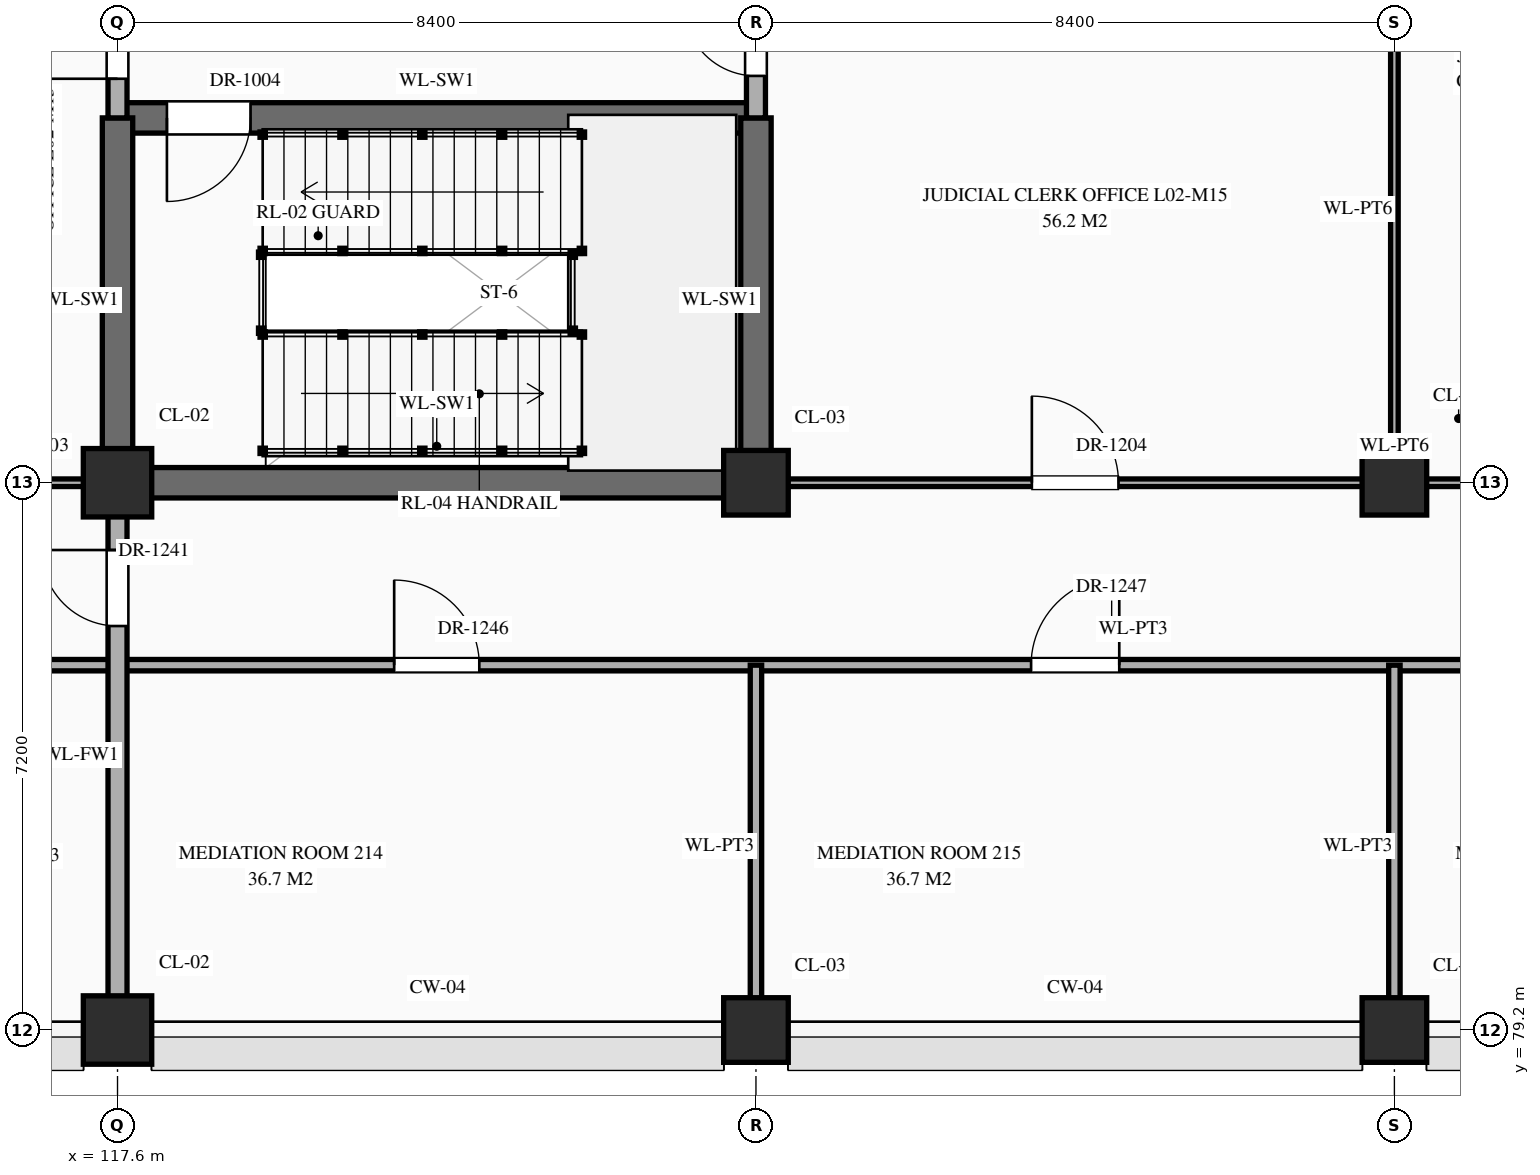
"""IFC4 building model, lengths in metres.
Left out: names, types, materials, properties, quantities, classifications, styles, units other than length and angle.
Written with IfcOpenShell. Run it as: python <this file> out.ifc"""

import sys

from ifc_helpers import new_model, si_unit, direction, frame, frame_2d, origin, origin_2d, place, context, subcontext, project, spatial, rectangle, extrude, element, fill, save


model = new_model("IFC4")
c1 = context("Model", 3, precision=1e-05, world=origin(), true_north=direction((0.0, 1.0)))
c2 = subcontext(c1, "Body", "Model", "MODEL_VIEW")
j1 = project(units=[si_unit("LENGTHUNIT", "METRE"), si_unit("PLANEANGLEUNIT", "RADIAN")], contexts=[c1])
p1 = place(None, origin())
s1 = spatial("IfcSite", under=j1, at=p1, CompositionType="ELEMENT")
p2 = place(p1, origin())
s2 = spatial("IfcBuilding", under=s1, at=p2, CompositionType="ELEMENT")
p3 = place(p2, frame((0.0, 0.0, 5.4)))
s3 = spatial("IfcBuildingStorey", under=s2, at=p3, CompositionType="ELEMENT", Elevation=5.4)
for number, where, z_axis, x_axis in (
    (1, (117.6, 79.2, 0.0), (0.0, 0.0, 1.0), (1.0, 0.0, 0.0)),
    (2, (117.6, 86.4, 0.0), (0.0, 0.0, 1.0), (1.0, 0.0, 0.0)),
):
    element("IfcColumn", number, at=place(p3, frame(where, z_axis=z_axis, x_axis=x_axis)), inside=s3, PredefinedType="COLUMN", context=c2, shape_type="SweptSolid", body=[
        extrude(rectangle(XDim=0.9, YDim=0.9, at=origin_2d()), origin(), (0.0, 0.0, 1.0), 5.4),
    ])
for number, where, z_axis, x_axis in (
    (3, (126.0, 79.2, 0.0), (0.0, 0.0, 1.0), (1.0, 0.0, 0.0)),
    (4, (126.0, 86.4, 0.0), (0.0, 0.0, 1.0), (1.0, 0.0, 0.0)),
    (5, (134.4, 79.2, 0.0), (0.0, 0.0, 1.0), (1.0, 0.0, 0.0)),
    (6, (134.4, 86.4, 0.0), (0.0, 0.0, 1.0), (1.0, 0.0, 0.0)),
):
    element("IfcColumn", number, at=place(p3, frame(where, z_axis=z_axis, x_axis=x_axis)), inside=s3, PredefinedType="COLUMN", context=c2, shape_type="SweptSolid", body=[
        extrude(rectangle(XDim=0.85, YDim=0.85, at=origin_2d()), origin(), (0.0, 0.0, 1.0), 5.4),
    ])
p4 = place(p3, frame((16.8, 84.0, 0.0), z_axis=(0.0, 0.0, 1.0), x_axis=(1.0, 0.0, 0.0)))
e7 = element("IfcWall", 7, at=p4, inside=s3, PredefinedType="STANDARD", context=c2, shape_type="SweptSolid", body=[
    extrude(rectangle(XDim=134.4, YDim=0.15, at=frame_2d((67.2, 0.0))), origin(), (0.0, 0.0, 1.0), 5.12),
])
p5 = place(p4, frame((3.58, 0.0, 0.0)))
e8 = element("IfcOpeningElement", 8, at=p5, cuts=e7, PredefinedType="OPENING", context=c2, shape_type="SweptSolid", body=[
    extrude(rectangle(XDim=1.24, YDim=2.3, at=frame_2d((0.62, 1.15))), frame((0.0, 0.087, 0.0), z_axis=(0.0, -1.0, 0.0), x_axis=(1.0, 0.0, 0.0)), (0.0, 0.0, 1.0), 0.174),
])
p6 = place(p4, frame((11.96, 0.0, 0.0)))
e9 = element("IfcOpeningElement", 9, at=p6, cuts=e7, PredefinedType="OPENING", context=c2, shape_type="SweptSolid", body=[
    extrude(rectangle(XDim=1.28, YDim=2.35, at=frame_2d((0.64, 1.175))), frame((0.0, 0.087, 0.0), z_axis=(0.0, -1.0, 0.0), x_axis=(1.0, 0.0, 0.0)), (0.0, 0.0, 1.0), 0.174),
])
p7 = place(p4, frame((20.53, 0.0, 0.0)))
e10 = element("IfcOpeningElement", 10, at=p7, cuts=e7, PredefinedType="OPENING", context=c2, shape_type="SweptSolid", body=[
    extrude(rectangle(XDim=0.94, YDim=2.3, at=frame_2d((0.47, 1.15))), frame((0.0, 0.087, 0.0), z_axis=(0.0, -1.0, 0.0), x_axis=(1.0, 0.0, 0.0)), (0.0, 0.0, 1.0), 0.174),
])
p8 = place(p4, frame((28.91, 0.0, 0.0)))
e11 = element("IfcOpeningElement", 11, at=p8, cuts=e7, PredefinedType="OPENING", context=c2, shape_type="SweptSolid", body=[
    extrude(rectangle(XDim=0.98, YDim=2.35, at=frame_2d((0.49, 1.175))), frame((0.0, 0.087, 0.0), z_axis=(0.0, -1.0, 0.0), x_axis=(1.0, 0.0, 0.0)), (0.0, 0.0, 1.0), 0.174),
])
p9 = place(p4, frame((37.27, 0.0, 0.0)))
e12 = element("IfcOpeningElement", 12, at=p9, cuts=e7, PredefinedType="OPENING", context=c2, shape_type="SweptSolid", body=[
    extrude(rectangle(XDim=1.06, YDim=2.4, at=frame_2d((0.53, 1.2))), frame((0.0, 0.087, 0.0), z_axis=(0.0, -1.0, 0.0), x_axis=(1.0, 0.0, 0.0)), (0.0, 0.0, 1.0), 0.174),
])
p10 = place(p4, frame((45.63, 0.0, 0.0)))
e13 = element("IfcOpeningElement", 13, at=p10, cuts=e7, PredefinedType="OPENING", context=c2, shape_type="SweptSolid", body=[
    extrude(rectangle(XDim=1.14, YDim=2.4, at=frame_2d((0.57, 1.2))), frame((0.0, 0.087, 0.0), z_axis=(0.0, -1.0, 0.0), x_axis=(1.0, 0.0, 0.0)), (0.0, 0.0, 1.0), 0.174),
])
p11 = place(p4, frame((54.15, 0.0, 0.0)))
e14 = element("IfcOpeningElement", 14, at=p11, cuts=e7, PredefinedType="OPENING", context=c2, shape_type="SweptSolid", body=[
    extrude(rectangle(XDim=0.9, YDim=2.15, at=frame_2d((0.45, 1.075))), frame((0.0, 0.087, 0.0), z_axis=(0.0, -1.0, 0.0), x_axis=(1.0, 0.0, 0.0)), (0.0, 0.0, 1.0), 0.174),
])
p12 = place(p4, frame((62.57, 0.0, 0.0)))
e15 = element("IfcOpeningElement", 15, at=p12, cuts=e7, PredefinedType="OPENING", context=c2, shape_type="SweptSolid", body=[
    extrude(rectangle(XDim=0.86, YDim=2.1, at=frame_2d((0.43, 1.05))), frame((0.0, 0.087, 0.0), z_axis=(0.0, -1.0, 0.0), x_axis=(1.0, 0.0, 0.0)), (0.0, 0.0, 1.0), 0.174),
])
p13 = place(p4, frame((70.92, 0.0, 0.0)))
e16 = element("IfcOpeningElement", 16, at=p13, cuts=e7, PredefinedType="OPENING", context=c2, shape_type="SweptSolid", body=[
    extrude(rectangle(XDim=0.96, YDim=2.2, at=frame_2d((0.48, 1.1))), frame((0.0, 0.087, 0.0), z_axis=(0.0, -1.0, 0.0), x_axis=(1.0, 0.0, 0.0)), (0.0, 0.0, 1.0), 0.174),
])
p14 = place(p4, frame((79.3, 0.0, 0.0)))
e17 = element("IfcOpeningElement", 17, at=p14, cuts=e7, PredefinedType="OPENING", context=c2, shape_type="SweptSolid", body=[
    extrude(rectangle(XDim=1.0, YDim=2.25, at=frame_2d((0.5, 1.125))), frame((0.0, 0.087, 0.0), z_axis=(0.0, -1.0, 0.0), x_axis=(1.0, 0.0, 0.0)), (0.0, 0.0, 1.0), 0.174),
])
p15 = place(p4, frame((87.68, 0.0, 0.0)))
e18 = element("IfcOpeningElement", 18, at=p15, cuts=e7, PredefinedType="OPENING", context=c2, shape_type="SweptSolid", body=[
    extrude(rectangle(XDim=1.04, YDim=2.2, at=frame_2d((0.52, 1.1))), frame((0.0, 0.087, 0.0), z_axis=(0.0, -1.0, 0.0), x_axis=(1.0, 0.0, 0.0)), (0.0, 0.0, 1.0), 0.174),
])
p16 = place(p4, frame((96.06, 0.0, 0.0)))
e19 = element("IfcOpeningElement", 19, at=p16, cuts=e7, PredefinedType="OPENING", context=c2, shape_type="SweptSolid", body=[
    extrude(rectangle(XDim=1.08, YDim=2.25, at=frame_2d((0.54, 1.125))), frame((0.0, 0.087, 0.0), z_axis=(0.0, -1.0, 0.0), x_axis=(1.0, 0.0, 0.0)), (0.0, 0.0, 1.0), 0.174),
])
p17 = place(p4, frame((104.44, 0.0, 0.0)))
e20 = element("IfcOpeningElement", 20, at=p17, cuts=e7, PredefinedType="OPENING", context=c2, shape_type="SweptSolid", body=[
    extrude(rectangle(XDim=1.12, YDim=2.25, at=frame_2d((0.56, 1.125))), frame((0.0, 0.087, 0.0), z_axis=(0.0, -1.0, 0.0), x_axis=(1.0, 0.0, 0.0)), (0.0, 0.0, 1.0), 0.174),
])
p18 = place(p4, frame((112.82, 0.0, 0.0)))
e21 = element("IfcOpeningElement", 21, at=p18, cuts=e7, PredefinedType="OPENING", context=c2, shape_type="SweptSolid", body=[
    extrude(rectangle(XDim=1.16, YDim=2.3, at=frame_2d((0.58, 1.15))), frame((0.0, 0.087, 0.0), z_axis=(0.0, -1.0, 0.0), x_axis=(1.0, 0.0, 0.0)), (0.0, 0.0, 1.0), 0.174),
])
p19 = place(p4, frame((121.2, 0.0, 0.0)))
e22 = element("IfcOpeningElement", 22, at=p19, cuts=e7, PredefinedType="OPENING", context=c2, shape_type="SweptSolid", body=[
    extrude(rectangle(XDim=1.2, YDim=2.35, at=frame_2d((0.6, 1.175))), frame((0.0, 0.087, 0.0), z_axis=(0.0, -1.0, 0.0), x_axis=(1.0, 0.0, 0.0)), (0.0, 0.0, 1.0), 0.174),
])
p20 = place(p4, frame((129.58, 0.0, 0.0)))
e23 = element("IfcOpeningElement", 23, at=p20, cuts=e7, PredefinedType="OPENING", context=c2, shape_type="SweptSolid", body=[
    extrude(rectangle(XDim=1.24, YDim=2.3, at=frame_2d((0.62, 1.15))), frame((0.0, 0.087, 0.0), z_axis=(0.0, -1.0, 0.0), x_axis=(1.0, 0.0, 0.0)), (0.0, 0.0, 1.0), 0.174),
])
p21 = place(p3, frame((109.2, 86.4, 0.0), z_axis=(0.0, 0.0, 1.0), x_axis=(1.0, 0.0, 0.0)))
e24 = element("IfcWall", 24, at=p21, inside=s3, PredefinedType="STANDARD", context=c2, shape_type="SweptSolid", body=[
    extrude(rectangle(XDim=8.4, YDim=0.1, at=frame_2d((4.2, 0.0))), origin(), (0.0, 0.0, 1.0), 4.27),
])
p22 = place(p21, frame((1.115, 0.0, 0.0)))
e25 = element("IfcOpeningElement", 25, at=p22, cuts=e24, PredefinedType="OPENING", context=c2, shape_type="SweptSolid", body=[
    extrude(rectangle(XDim=0.94, YDim=2.3, at=frame_2d((0.47, 1.15))), frame((0.0, 0.062, 0.0), z_axis=(0.0, -1.0, 0.0), x_axis=(1.0, 0.0, 0.0)), (0.0, 0.0, 1.0), 0.124),
])
p23 = place(p21, frame((3.69, 0.0, 0.0)))
e26 = element("IfcOpeningElement", 26, at=p23, cuts=e24, PredefinedType="OPENING", context=c2, shape_type="SweptSolid", body=[
    extrude(rectangle(XDim=1.02, YDim=2.4, at=frame_2d((0.51, 1.2))), frame((0.0, 0.062, 0.0), z_axis=(0.0, -1.0, 0.0), x_axis=(1.0, 0.0, 0.0)), (0.0, 0.0, 1.0), 0.124),
])
p24 = place(p21, frame((6.285, 0.0, 0.0)))
e27 = element("IfcOpeningElement", 27, at=p24, cuts=e24, PredefinedType="OPENING", context=c2, shape_type="SweptSolid", body=[
    extrude(rectangle(XDim=1.06, YDim=2.4, at=frame_2d((0.53, 1.2))), frame((0.0, 0.062, 0.0), z_axis=(0.0, -1.0, 0.0), x_axis=(1.0, 0.0, 0.0)), (0.0, 0.0, 1.0), 0.124),
])
p25 = place(p3, frame((117.6, 86.4, 0.0), z_axis=(0.0, 0.0, 1.0), x_axis=(1.0, 0.0, 0.0)))
e28 = element("IfcWall", 28, at=p25, inside=s3, PredefinedType="SHEAR", context=c2, shape_type="SweptSolid", body=[
    extrude(rectangle(XDim=8.4, YDim=0.4, at=frame_2d((4.2, 0.0))), origin(), (0.0, 0.0, 1.0), 5.12),
])
p26 = place(p3, frame((126.0, 86.4, 0.0), z_axis=(0.0, 0.0, 1.0), x_axis=(1.0, 0.0, 0.0)))
e29 = element("IfcWall", 29, at=p26, inside=s3, PredefinedType="STANDARD", context=c2, shape_type="SweptSolid", body=[
    extrude(rectangle(XDim=16.8, YDim=0.1, at=frame_2d((8.4, 0.0))), origin(), (0.0, 0.0, 1.0), 4.27),
])
p27 = place(p26, frame((3.63, 0.0, 0.0)))
e30 = element("IfcOpeningElement", 30, at=p27, cuts=e29, PredefinedType="OPENING", context=c2, shape_type="SweptSolid", body=[
    extrude(rectangle(XDim=1.14, YDim=2.4, at=frame_2d((0.57, 1.2))), frame((0.0, 0.062, 0.0), z_axis=(0.0, -1.0, 0.0), x_axis=(1.0, 0.0, 0.0)), (0.0, 0.0, 1.0), 0.124),
])
p28 = place(p26, frame((9.542, 0.0, 0.0)))
e31 = element("IfcOpeningElement", 31, at=p28, cuts=e29, PredefinedType="OPENING", context=c2, shape_type="SweptSolid", body=[
    extrude(rectangle(XDim=0.86, YDim=2.1, at=frame_2d((0.43, 1.05))), frame((0.0, 0.062, 0.0), z_axis=(0.0, -1.0, 0.0), x_axis=(1.0, 0.0, 0.0)), (0.0, 0.0, 1.0), 0.124),
])
p29 = place(p26, frame((11.875, 0.0, 0.0)))
e32 = element("IfcOpeningElement", 32, at=p29, cuts=e29, PredefinedType="OPENING", context=c2, shape_type="SweptSolid", body=[
    extrude(rectangle(XDim=1.45, YDim=2.3, at=frame_2d((0.725, 1.15))), frame((0.0, 0.062, 0.0), z_axis=(0.0, -1.0, 0.0), x_axis=(1.0, 0.0, 0.0)), (0.0, 0.0, 1.0), 0.124),
])
p30 = place(p26, frame((14.728, 0.0, 0.0)))
e33 = element("IfcOpeningElement", 33, at=p30, cuts=e29, PredefinedType="OPENING", context=c2, shape_type="SweptSolid", body=[
    extrude(rectangle(XDim=1.0, YDim=2.25, at=frame_2d((0.5, 1.125))), frame((0.0, 0.062, 0.0), z_axis=(0.0, -1.0, 0.0), x_axis=(1.0, 0.0, 0.0)), (0.0, 0.0, 1.0), 0.124),
])
p31 = place(p3, frame((117.6, 91.2, 0.0), z_axis=(0.0, 0.0, 1.0), x_axis=(1.0, 0.0, 0.0)))
e34 = element("IfcWall", 34, at=p31, inside=s3, PredefinedType="SHEAR", context=c2, shape_type="SweptSolid", body=[
    extrude(rectangle(XDim=8.4, YDim=0.4, at=frame_2d((4.2, 0.0))), origin(), (0.0, 0.0, 1.0), 5.12),
])
p32 = place(p31, frame((0.65, 0.0, 0.0)))
e35 = element("IfcOpeningElement", 35, at=p32, cuts=e34, PredefinedType="OPENING", context=c2, shape_type="SweptSolid", body=[
    extrude(rectangle(XDim=1.1, YDim=2.2, at=frame_2d((0.55, 1.1))), frame((0.0, 0.212, 0.0), z_axis=(0.0, -1.0, 0.0), x_axis=(1.0, 0.0, 0.0)), (0.0, 0.0, 1.0), 0.424),
])
p33 = place(p3, frame((117.6, 79.24, 0.0), z_axis=(0.0, 0.0, 1.0), x_axis=(0.0, 1.0, 0.0)))
e36 = element("IfcWall", 36, at=p33, inside=s3, PredefinedType="STANDARD", context=c2, shape_type="SweptSolid", body=[
    extrude(rectangle(XDim=7.16, YDim=0.25, at=frame_2d((3.58, 0.0))), origin(), (0.0, 0.0, 1.0), 4.37),
])
p34 = place(p33, frame((5.275, 0.0, 0.0)))
e37 = element("IfcOpeningElement", 37, at=p34, cuts=e36, PredefinedType="OPENING", context=c2, shape_type="SweptSolid", body=[
    extrude(rectangle(XDim=1.0, YDim=2.2, at=frame_2d((0.5, 1.1))), frame((0.0, 0.137, 0.0), z_axis=(0.0, -1.0, 0.0), x_axis=(1.0, 0.0, 0.0)), (0.0, 0.0, 1.0), 0.274),
])
p35 = place(p3, frame((117.6, 86.4, 0.0), z_axis=(0.0, 0.0, 1.0), x_axis=(0.0, 1.0, 0.0)))
e38 = element("IfcWall", 38, at=p35, inside=s3, PredefinedType="SHEAR", context=c2, shape_type="SweptSolid", body=[
    extrude(rectangle(XDim=4.8, YDim=0.4, at=frame_2d((2.4, 0.0))), origin(), (0.0, 0.0, 1.0), 5.12),
])
p36 = place(p3, frame((117.6, 91.2, 0.0), z_axis=(0.0, 0.0, 1.0), x_axis=(0.0, 1.0, 0.0)))
e39 = element("IfcWall", 39, at=p36, inside=s3, PredefinedType="STANDARD", context=c2, shape_type="SweptSolid", body=[
    extrude(rectangle(XDim=13.2, YDim=0.25, at=frame_2d((6.6, 0.0))), origin(), (0.0, 0.0, 1.0), 4.37),
])
p37 = place(p36, frame((0.515, 0.0, 0.0)))
e40 = element("IfcOpeningElement", 40, at=p37, cuts=e39, PredefinedType="OPENING", context=c2, shape_type="SweptSolid", body=[
    extrude(rectangle(XDim=1.0, YDim=2.2, at=frame_2d((0.5, 1.1))), frame((0.0, 0.137, 0.0), z_axis=(0.0, -1.0, 0.0), x_axis=(1.0, 0.0, 0.0)), (0.0, 0.0, 1.0), 0.274),
])
p38 = place(p36, frame((10.435, 0.0, 0.0)))
e41 = element("IfcOpeningElement", 41, at=p38, cuts=e39, PredefinedType="OPENING", context=c2, shape_type="SweptSolid", body=[
    extrude(rectangle(XDim=1.1, YDim=2.2, at=frame_2d((0.55, 1.1))), frame((0.0, 0.137, 0.0), z_axis=(0.0, -1.0, 0.0), x_axis=(1.0, 0.0, 0.0)), (0.0, 0.0, 1.0), 0.274),
])
p39 = place(p36, frame((3.285, 0.0, 0.0)))
e42 = element("IfcOpeningElement", 42, at=p39, cuts=e39, PredefinedType="OPENING", context=c2, shape_type="SweptSolid", body=[
    extrude(rectangle(XDim=1.0, YDim=2.2, at=frame_2d((0.5, 1.1))), frame((0.0, 0.137, 0.0), z_axis=(0.0, -1.0, 0.0), x_axis=(1.0, 0.0, 0.0)), (0.0, 0.0, 1.0), 0.274),
])
p40 = place(p3, frame((126.0, 79.24, 0.0), z_axis=(0.0, 0.0, 1.0), x_axis=(0.0, 1.0, 0.0)))
e43 = element("IfcWall", 43, at=p40, inside=s3, PredefinedType="STANDARD", context=c2, shape_type="SweptSolid", body=[
    extrude(rectangle(XDim=4.76, YDim=0.15, at=frame_2d((2.38, 0.0))), origin(), (0.0, 0.0, 1.0), 4.37),
])
p41 = place(p3, frame((126.0, 86.4, 0.0), z_axis=(0.0, 0.0, 1.0), x_axis=(0.0, 1.0, 0.0)))
e44 = element("IfcWall", 44, at=p41, inside=s3, PredefinedType="SHEAR", context=c2, shape_type="SweptSolid", body=[
    extrude(rectangle(XDim=4.8, YDim=0.4, at=frame_2d((2.4, 0.0))), origin(), (0.0, 0.0, 1.0), 5.12),
])
p42 = place(p3, frame((126.0, 91.2, 0.0), z_axis=(0.0, 0.0, 1.0), x_axis=(0.0, 1.0, 0.0)))
e45 = element("IfcWall", 45, at=p42, inside=s3, PredefinedType="STANDARD", context=c2, shape_type="SweptSolid", body=[
    extrude(rectangle(XDim=2.4, YDim=0.25, at=frame_2d((1.2, 0.0))), origin(), (0.0, 0.0, 1.0), 4.37),
])
p43 = place(p42, frame((0.552, 0.0, 0.0)))
e46 = element("IfcOpeningElement", 46, at=p43, cuts=e45, PredefinedType="OPENING", context=c2, shape_type="SweptSolid", body=[
    extrude(rectangle(XDim=0.95, YDim=2.15, at=frame_2d((0.475, 1.075))), frame((0.0, 0.137, 0.0), z_axis=(0.0, -1.0, 0.0), x_axis=(1.0, 0.0, 0.0)), (0.0, 0.0, 1.0), 0.274),
])
p44 = place(p3, frame((134.4, 79.24, 0.0), z_axis=(0.0, 0.0, 1.0), x_axis=(0.0, 1.0, 0.0)))
e47 = element("IfcWall", 47, at=p44, inside=s3, PredefinedType="STANDARD", context=c2, shape_type="SweptSolid", body=[
    extrude(rectangle(XDim=4.76, YDim=0.15, at=frame_2d((2.38, 0.0))), origin(), (0.0, 0.0, 1.0), 4.37),
])
p45 = place(p3, frame((134.4, 86.4, 0.0), z_axis=(0.0, 0.0, 1.0), x_axis=(0.0, 1.0, 0.0)))
e48 = element("IfcWall", 48, at=p45, inside=s3, PredefinedType="STANDARD", context=c2, shape_type="SweptSolid", body=[
    extrude(rectangle(XDim=7.2, YDim=0.1, at=frame_2d((3.6, 0.0))), origin(), (0.0, 0.0, 1.0), 4.37),
])
p46 = place(p32, frame((1.1, 0.0, 0.0), z_axis=(0.0, 0.0, 1.0), x_axis=(-1.0, 0.0, 0.0)))
e49 = element("IfcDoor", 49, at=p46, inside=s3, OperationType="SINGLE_SWING_RIGHT", PredefinedType="DOOR", context=c2, shape_type="SweptSolid", body=[
    extrude(rectangle(XDim=1.1, YDim=2.2, at=frame_2d((0.55, 1.1))), frame((0.0, 0.025, 0.0), z_axis=(0.0, -1.0, 0.0), x_axis=(1.0, 0.0, 0.0)), (0.0, 0.0, 1.0), 0.05),
])
fill(e35, e49)
p47 = place(p37, origin())
e50 = element("IfcDoor", 50, at=p47, inside=s3, OperationType="SINGLE_SWING_LEFT", PredefinedType="DOOR", context=c2, shape_type="SweptSolid", body=[
    extrude(rectangle(XDim=1.0, YDim=2.2, at=frame_2d((0.5, 1.1))), frame((0.0, 0.025, 0.0), z_axis=(0.0, -1.0, 0.0), x_axis=(1.0, 0.0, 0.0)), (0.0, 0.0, 1.0), 0.05),
])
fill(e40, e50)
p48 = place(p43, origin())
e51 = element("IfcDoor", 51, at=p48, inside=s3, OperationType="SINGLE_SWING_RIGHT", PredefinedType="DOOR", context=c2, shape_type="SweptSolid", body=[
    extrude(rectangle(XDim=0.95, YDim=2.15, at=frame_2d((0.475, 1.075))), frame((0.0, 0.025, 0.0), z_axis=(0.0, -1.0, 0.0), x_axis=(1.0, 0.0, 0.0)), (0.0, 0.0, 1.0), 0.05),
])
fill(e46, e51)
p49 = place(p27, origin())
e52 = element("IfcDoor", 52, at=p49, inside=s3, OperationType="SINGLE_SWING_LEFT", PredefinedType="DOOR", context=c2, shape_type="SweptSolid", body=[
    extrude(rectangle(XDim=1.14, YDim=2.4, at=frame_2d((0.57, 1.2))), frame((0.0, 0.025, 0.0), z_axis=(0.0, -1.0, 0.0), x_axis=(1.0, 0.0, 0.0)), (0.0, 0.0, 1.0), 0.05),
])
fill(e30, e52)
p50 = place(p34, origin())
e53 = element("IfcDoor", 53, at=p50, inside=s3, OperationType="SINGLE_SWING_RIGHT", PredefinedType="DOOR", context=c2, shape_type="SweptSolid", body=[
    extrude(rectangle(XDim=1.0, YDim=2.2, at=frame_2d((0.5, 1.1))), frame((0.0, 0.025, 0.0), z_axis=(0.0, -1.0, 0.0), x_axis=(1.0, 0.0, 0.0)), (0.0, 0.0, 1.0), 0.05),
])
fill(e37, e53)
p51 = place(p17, origin())
e54 = element("IfcDoor", 54, at=p51, inside=s3, OperationType="SINGLE_SWING_LEFT", PredefinedType="DOOR", context=c2, shape_type="SweptSolid", body=[
    extrude(rectangle(XDim=1.12, YDim=2.25, at=frame_2d((0.56, 1.125))), frame((0.0, 0.025, 0.0), z_axis=(0.0, -1.0, 0.0), x_axis=(1.0, 0.0, 0.0)), (0.0, 0.0, 1.0), 0.05),
])
fill(e20, e54)
p52 = place(p18, origin())
e55 = element("IfcDoor", 55, at=p52, inside=s3, OperationType="SINGLE_SWING_RIGHT", PredefinedType="DOOR", context=c2, shape_type="SweptSolid", body=[
    extrude(rectangle(XDim=1.16, YDim=2.3, at=frame_2d((0.58, 1.15))), frame((0.0, 0.025, 0.0), z_axis=(0.0, -1.0, 0.0), x_axis=(1.0, 0.0, 0.0)), (0.0, 0.0, 1.0), 0.05),
])
fill(e21, e55)
save(model, sys.argv[1])
